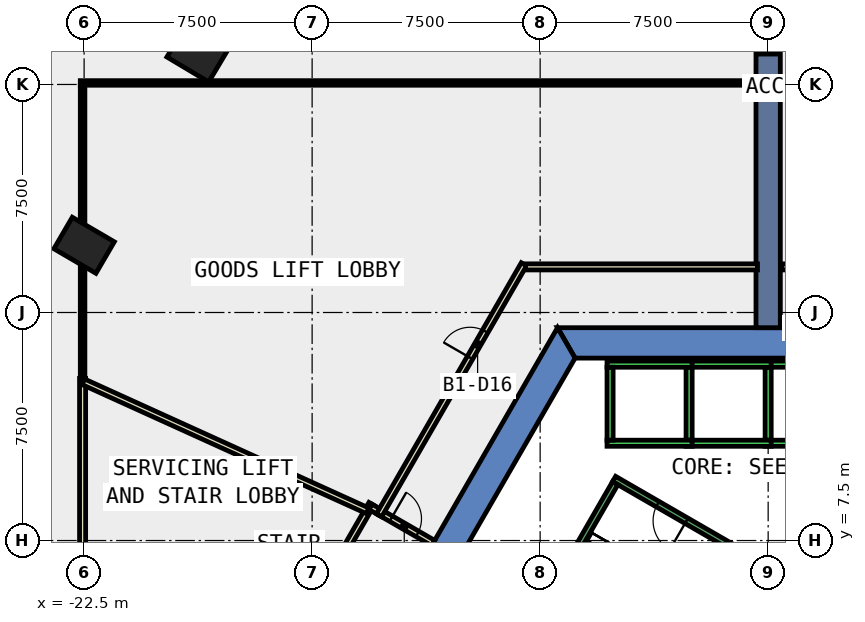
"""IFC4 building model, lengths in metres.
Left out: names, types, materials, properties, quantities, classifications, styles, units other than length and angle.
Written with IfcOpenShell. Run it as: python <this file> out.ifc"""

import sys

from ifc_helpers import new_model, si_unit, direction, frame, frame_2d, origin, origin_2d, place, context, subcontext, project, spatial, polyline, rectangle, outline, extrude, element, fill, save


model = new_model("IFC4")
c1 = context("Model", 3, precision=1e-05, world=origin(), true_north=direction((0.0, 1.0)))
c2 = subcontext(c1, "Body", "Model", "MODEL_VIEW")
j1 = project(units=[si_unit("LENGTHUNIT", "METRE"), si_unit("PLANEANGLEUNIT", "RADIAN")], contexts=[c1])
p1 = place(None, origin())
s1 = spatial("IfcSite", under=j1, at=p1, CompositionType="ELEMENT")
p2 = place(p1, origin())
s2 = spatial("IfcBuilding", under=s1, at=p2, CompositionType="ELEMENT")
p3 = place(p2, frame((0.0, 0.0, -5.5)))
s3 = spatial("IfcBuildingStorey", under=s2, at=p3, CompositionType="ELEMENT", Elevation=-5.5)
for number, where, z_axis, x_axis in (
    (1, (-18.782, 23.508, -0.42), (0.0, 0.0, 1.0), (0.513, 0.858, 0.0)),
    (2, (-22.5, 17.211, -0.42), (0.0, 0.0, 1.0), (0.504, 0.864, 0.0)),
):
    element("IfcColumn", number, at=place(p3, frame(where, z_axis=z_axis, x_axis=x_axis)), inside=s3, PredefinedType="COLUMN", context=c2, shape_type="SweptSolid", body=[
        extrude(rectangle(XDim=1.2, YDim=1.6, at=origin_2d()), origin(), (0.0, 0.0, 1.0), 5.42),
    ])
p4 = place(p3, frame((0.0, 0.0, -0.42)))
e3 = element("IfcWall", 3, at=p4, inside=s3, PredefinedType="SHEAR", context=c2, shape_type="SweptSolid", body=[
    extrude(outline(polyline([(6.928, 14.5), (-6.928, 14.5), (-6.351, 13.5), (6.351, 13.5), (6.928, 14.5)])), origin(), (0.0, 0.0, 1.0), 5.42),
])
p5 = place(p3, frame((0.0, 0.0, -0.42)))
e4 = element("IfcWall", 4, at=p5, inside=s3, PredefinedType="SHEAR", context=c2, shape_type="SweptSolid", body=[
    extrude(outline(polyline([(-12.267, 5.252), (-11.402, 4.752), (-6.351, 13.5), (-6.928, 14.5), (-12.267, 5.252)])), origin(), (0.0, 0.0, 1.0), 5.42),
])
p6 = place(p3, frame((0.0, 14.5, -0.42), z_axis=(0.0, 0.0, 1.0), x_axis=(0.0, 1.0, 0.0)))
e5 = element("IfcWall", 5, at=p6, inside=s3, PredefinedType="SHEAR", context=c2, shape_type="SweptSolid", body=[
    extrude(rectangle(XDim=9.0, YDim=0.8, at=frame_2d((4.5, 0.0))), origin(), (0.0, 0.0, 1.0), 5.42),
])
p7 = place(p3, frame((0.45, 16.5, 0.0), z_axis=(0.0, 0.0, 1.0), x_axis=(1.0, 0.0, 0.0)))
e6 = element("IfcWall", 6, at=p7, inside=s3, PredefinedType="PARTITIONING", context=c2, shape_type="SweptSolid", body=[
    extrude(rectangle(XDim=2.222, YDim=0.2, at=frame_2d((1.111, 0.0))), origin(), (0.0, 0.0, 1.0), 4.9),
])
p8 = place(p7, frame((0.742, 0.0, 0.0)))
e7 = element("IfcOpeningElement", 7, at=p8, cuts=e6, PredefinedType="OPENING", context=c2, shape_type="SweptSolid", body=[
    extrude(rectangle(XDim=1.0, YDim=2.1, at=frame_2d((0.5, 1.05))), frame((0.0, 0.11, 0.0), z_axis=(0.0, -1.0, 0.0), x_axis=(1.0, 0.0, 0.0)), (0.0, 0.0, 1.0), 0.22),
])
p9 = place(p3, frame((-22.55, -0.608, 0.0), z_axis=(0.0, 0.0, 1.0), x_axis=(0.0, 1.0, 0.0)))
e8 = element("IfcWall", 8, at=p9, inside=s3, PredefinedType="PARTITIONING", context=c2, shape_type="SweptSolid", body=[
    extrude(rectangle(XDim=13.439, YDim=0.2, at=frame_2d((6.719, 0.0))), origin(), (0.0, 0.0, 1.0), 4.9),
])
p10 = place(p9, frame((3.93, 0.0, 0.0)))
e9 = element("IfcOpeningElement", 9, at=p10, cuts=e8, PredefinedType="OPENING", context=c2, shape_type="SweptSolid", body=[
    extrude(rectangle(XDim=1.8, YDim=2.1, at=frame_2d((0.9, 1.05))), frame((0.0, 0.11, 0.0), z_axis=(0.0, -1.0, 0.0), x_axis=(1.0, 0.0, 0.0)), (0.0, 0.0, 1.0), 0.22),
])
p11 = place(p3, frame((-22.55, 12.831, 0.0), z_axis=(0.0, 0.0, 1.0), x_axis=(0.0, 1.0, 0.0)))
e10 = element("IfcWall", 10, at=p11, inside=s3, PredefinedType="PARTITIONING", context=c2, shape_type="SweptSolid", body=[
    extrude(rectangle(XDim=9.644, YDim=0.15, at=frame_2d((4.822, 0.0))), origin(), (0.0, 0.0, 1.0), 4.9),
])
p12 = place(p3, frame((-22.625, 22.55, 0.0), z_axis=(0.0, 0.0, 1.0), x_axis=(1.0, 0.0, 0.0)))
e11 = element("IfcWall", 11, at=p12, inside=s3, PredefinedType="PARTITIONING", context=c2, shape_type="SweptSolid", body=[
    extrude(rectangle(XDim=22.25, YDim=0.15, at=frame_2d((11.125, 0.0))), origin(), (0.0, 0.0, 1.0), 4.9),
])
p13 = place(p3, frame((-12.749, 8.417, 0.0), z_axis=(0.0, 0.0, 1.0), x_axis=(0.866010750942, -0.50002537861, 0.0)))
e12 = element("IfcWall", 12, at=p13, inside=s3, PredefinedType="PARTITIONING", context=c2, shape_type="SweptSolid", body=[
    extrude(rectangle(XDim=2.0, YDim=0.2, at=frame_2d((1.0, 0.0))), origin(), (0.0, 0.0, 1.0), 4.9),
])
p14 = place(p13, frame((0.4, 0.0, 0.0)))
e13 = element("IfcOpeningElement", 13, at=p14, cuts=e12, PredefinedType="OPENING", context=c2, shape_type="SweptSolid", body=[
    extrude(rectangle(XDim=1.0, YDim=2.1, at=frame_2d((0.5, 1.05))), frame((0.0, 0.11, 0.0), z_axis=(0.0, -1.0, 0.0), x_axis=(1.0, 0.0, 0.0)), (0.0, 0.0, 1.0), 0.22),
])
p15 = place(p3, frame((-16.645, 2.468, 0.0), z_axis=(0.0, 0.0, 1.0), x_axis=(0.499968011863, 0.866043871356, 0.0)))
e14 = element("IfcWall", 14, at=p15, inside=s3, PredefinedType="PARTITIONING", context=c2, shape_type="SweptSolid", body=[
    extrude(rectangle(XDim=7.201, YDim=0.2, at=frame_2d((3.6, 0.0))), origin(), (0.0, 0.0, 1.0), 4.9),
])
p16 = place(p15, frame((2.409, 0.0, 0.0)))
e15 = element("IfcOpeningElement", 15, at=p16, cuts=e14, PredefinedType="OPENING", context=c2, shape_type="SweptSolid", body=[
    extrude(rectangle(XDim=1.0, YDim=2.1, at=frame_2d((0.5, 1.05))), frame((0.0, 0.11, 0.0), z_axis=(0.0, -1.0, 0.0), x_axis=(1.0, 0.0, 0.0)), (0.0, 0.0, 1.0), 0.22),
])
p17 = place(p3, frame((-13.082, 8.609, 0.0), z_axis=(0.0, 0.0, 1.0), x_axis=(0.865998573537, -0.500046468473, 0.0)))
e16 = element("IfcWall", 16, at=p17, inside=s3, PredefinedType="PARTITIONING", context=c2, shape_type="SweptSolid", body=[
    extrude(rectangle(XDim=0.37, YDim=0.2, at=frame_2d((0.185, 0.0))), origin(), (0.0, 0.0, 1.0), 4.9),
])
p18 = place(p3, frame((-12.799, 8.33, 0.0), z_axis=(0.0, 0.0, 1.0), x_axis=(0.499923440311, 0.86606960103, 0.0)))
e17 = element("IfcWall", 17, at=p18, inside=s3, PredefinedType="PARTITIONING", context=c2, shape_type="SweptSolid", body=[
    extrude(rectangle(XDim=9.534, YDim=0.2, at=frame_2d((4.767, 0.0))), origin(), (0.0, 0.0, 1.0), 4.9),
])
p19 = place(p18, frame((5.986, 0.0, 0.0)))
e18 = element("IfcOpeningElement", 18, at=p19, cuts=e17, PredefinedType="OPENING", context=c2, shape_type="SweptSolid", body=[
    extrude(rectangle(XDim=1.0, YDim=2.1, at=frame_2d((0.5, 1.05))), frame((0.0, 0.11, 0.0), z_axis=(0.0, -1.0, 0.0), x_axis=(1.0, 0.0, 0.0)), (0.0, 0.0, 1.0), 0.22),
])
p20 = place(p3, frame((-7.983, 16.5, 0.0), z_axis=(0.0, 0.0, 1.0), x_axis=(1.0, 0.0, 0.0)))
e19 = element("IfcWall", 19, at=p20, inside=s3, PredefinedType="PARTITIONING", context=c2, shape_type="SweptSolid", body=[
    extrude(rectangle(XDim=7.633, YDim=0.2, at=frame_2d((3.816, 0.0))), origin(), (0.0, 0.0, 1.0), 4.9),
])
p21 = place(p3, frame((-22.527, 12.721, 0.0), z_axis=(0.0, 0.0, 1.0), x_axis=(0.910643923171, -0.413192019758, 0.0)))
e20 = element("IfcWall", 20, at=p21, inside=s3, PredefinedType="PARTITIONING", context=c2, shape_type="SweptSolid", body=[
    extrude(rectangle(XDim=10.269, YDim=0.2, at=frame_2d((5.134, 0.0))), origin(), (0.0, 0.0, 1.0), 4.9),
])
for number, where, z_axis, x_axis in (
    (21, (2.7, 10.7, 0.0), (0.0, 0.0, 1.0), (-1.0, 0.0, 0.0)),
    (22, (2.7, 13.3, 0.0), (0.0, 0.0, 1.0), (-1.0, 0.0, 0.0)),
):
    element("IfcWall", number, at=place(p3, frame(where, z_axis=z_axis, x_axis=x_axis)), inside=s3, PredefinedType="STANDARD", context=c2, shape_type="SweptSolid", body=[
        extrude(rectangle(XDim=2.8, YDim=0.2, at=frame_2d((1.4, 0.0))), origin(), (0.0, 0.0, 1.0), 3.6),
    ])
p22 = place(p3, frame((0.0, 10.8, 0.0), z_axis=(0.0, 0.0, 1.0), x_axis=(0.0, 1.0, 0.0)))
e23 = element("IfcWall", 23, at=p22, inside=s3, PredefinedType="STANDARD", context=c2, shape_type="SweptSolid", body=[
    extrude(rectangle(XDim=2.4, YDim=0.2, at=frame_2d((1.2, 0.0))), origin(), (0.0, 0.0, 1.0), 3.6),
])
for number, where, z_axis, x_axis in (
    (24, (0.1, 10.7, 0.0), (0.0, 0.0, 1.0), (-1.0, 0.0, 0.0)),
    (25, (0.1, 13.3, 0.0), (0.0, 0.0, 1.0), (-1.0, 0.0, 0.0)),
):
    element("IfcWall", number, at=place(p3, frame(where, z_axis=z_axis, x_axis=x_axis)), inside=s3, PredefinedType="STANDARD", context=c2, shape_type="SweptSolid", body=[
        extrude(rectangle(XDim=2.8, YDim=0.2, at=frame_2d((1.4, 0.0))), origin(), (0.0, 0.0, 1.0), 3.6),
    ])
p23 = place(p3, frame((-2.6, 10.8, 0.0), z_axis=(0.0, 0.0, 1.0), x_axis=(0.0, 1.0, 0.0)))
e26 = element("IfcWall", 26, at=p23, inside=s3, PredefinedType="STANDARD", context=c2, shape_type="SweptSolid", body=[
    extrude(rectangle(XDim=2.4, YDim=0.2, at=frame_2d((1.2, 0.0))), origin(), (0.0, 0.0, 1.0), 3.6),
])
for number, where, z_axis, x_axis in (
    (27, (-2.5, 10.7, 0.0), (0.0, 0.0, 1.0), (-1.0, 0.0, 0.0)),
    (28, (-2.5, 13.3, 0.0), (0.0, 0.0, 1.0), (-1.0, 0.0, 0.0)),
):
    element("IfcWall", number, at=place(p3, frame(where, z_axis=z_axis, x_axis=x_axis)), inside=s3, PredefinedType="STANDARD", context=c2, shape_type="SweptSolid", body=[
        extrude(rectangle(XDim=2.8, YDim=0.2, at=frame_2d((1.4, 0.0))), origin(), (0.0, 0.0, 1.0), 3.6),
    ])
p24 = place(p3, frame((-5.2, 10.8, 0.0), z_axis=(0.0, 0.0, 1.0), x_axis=(0.0, 1.0, 0.0)))
e29 = element("IfcWall", 29, at=p24, inside=s3, PredefinedType="STANDARD", context=c2, shape_type="SweptSolid", body=[
    extrude(rectangle(XDim=2.4, YDim=0.2, at=frame_2d((1.2, 0.0))), origin(), (0.0, 0.0, 1.0), 3.6),
])
p25 = place(p3, frame((-1.256, 7.324, 0.0), z_axis=(0.0, 0.0, 1.0), x_axis=(-0.866046073146, 0.499964197906, 0.0)))
e30 = element("IfcWall", 30, at=p25, inside=s3, PredefinedType="STANDARD", context=c2, shape_type="SweptSolid", body=[
    extrude(rectangle(XDim=4.4, YDim=0.2, at=frame_2d((2.2, 0.0))), origin(), (0.0, 0.0, 1.0), 4.9),
])
p26 = place(p25, frame((1.65, 0.0, 0.0)))
e31 = element("IfcOpeningElement", 31, at=p26, cuts=e30, PredefinedType="OPENING", context=c2, shape_type="SweptSolid", body=[
    extrude(rectangle(XDim=1.1, YDim=2.2, at=frame_2d((0.55, 1.1))), frame((0.0, 0.11, 0.0), z_axis=(0.0, -1.0, 0.0), x_axis=(1.0, 0.0, 0.0)), (0.0, 0.0, 1.0), 0.22),
])
p27 = place(p3, frame((-5.03, 9.388, 0.0), z_axis=(0.0, 0.0, 1.0), x_axis=(-0.499978703459, -0.866037698999, 0.0)))
e32 = element("IfcWall", 32, at=p27, inside=s3, PredefinedType="STANDARD", context=c2, shape_type="SweptSolid", body=[
    extrude(rectangle(XDim=6.9, YDim=0.2, at=frame_2d((3.45, 0.0))), origin(), (0.0, 0.0, 1.0), 4.9),
])
p28 = place(p14, origin())
e33 = element("IfcDoor", 33, at=p28, inside=s3, OperationType="SINGLE_SWING_LEFT", PredefinedType="DOOR", context=c2, shape_type="SweptSolid", body=[
    extrude(rectangle(XDim=1.0, YDim=2.1, at=frame_2d((0.5, 1.05))), frame((0.0, 0.025, 0.0), z_axis=(0.0, -1.0, 0.0), x_axis=(1.0, 0.0, 0.0)), (0.0, 0.0, 1.0), 0.05),
])
fill(e13, e33)
p29 = place(p19, origin())
e34 = element("IfcDoor", 34, at=p29, inside=s3, OperationType="SINGLE_SWING_RIGHT", PredefinedType="DOOR", context=c2, shape_type="SweptSolid", body=[
    extrude(rectangle(XDim=1.0, YDim=2.1, at=frame_2d((0.5, 1.05))), frame((0.0, 0.025, 0.0), z_axis=(0.0, -1.0, 0.0), x_axis=(1.0, 0.0, 0.0)), (0.0, 0.0, 1.0), 0.05),
])
fill(e18, e34)
p30 = place(p26, origin())
e35 = element("IfcDoor", 35, at=p30, inside=s3, OperationType="SINGLE_SWING_LEFT", PredefinedType="DOOR", context=c2, shape_type="SweptSolid", body=[
    extrude(rectangle(XDim=1.1, YDim=2.2, at=frame_2d((0.55, 1.1))), frame((0.0, 0.025, 0.0), z_axis=(0.0, -1.0, 0.0), x_axis=(1.0, 0.0, 0.0)), (0.0, 0.0, 1.0), 0.05),
])
fill(e31, e35)
save(model, sys.argv[1])
